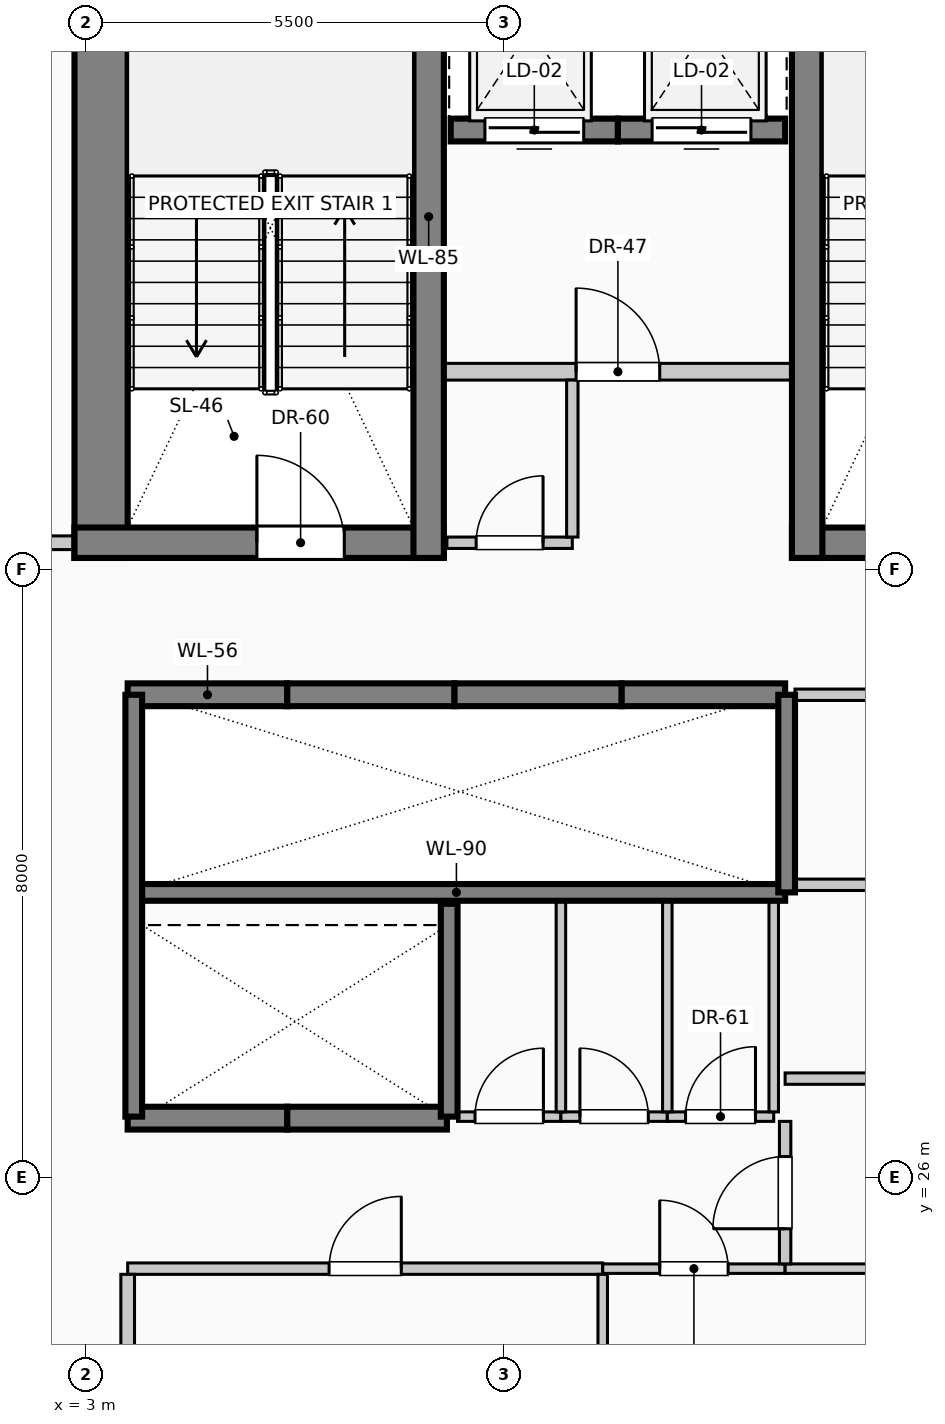
"""IFC4 building model, lengths in metres.
Left out: names, types, materials, properties, quantities, classifications, styles, units other than length and angle.
Written with IfcOpenShell. Run it as: python <this file> out.ifc"""

import sys

from ifc_helpers import new_model, si_unit, direction, frame, frame_2d, origin, place, context, subcontext, project, spatial, rectangle, extrude, element, fill, save


model = new_model("IFC4")
c1 = context("Model", 3, precision=1e-05, world=origin(), true_north=direction((0.0, 1.0)))
c2 = subcontext(c1, "Body", "Model", "MODEL_VIEW")
j1 = project(units=[si_unit("LENGTHUNIT", "METRE"), si_unit("PLANEANGLEUNIT", "RADIAN")], contexts=[c1])
p1 = place(None, origin())
s1 = spatial("IfcSite", under=j1, at=p1, CompositionType="ELEMENT")
p2 = place(p1, origin())
s2 = spatial("IfcBuilding", under=s1, at=p2, CompositionType="ELEMENT")
p3 = place(p2, frame((0.0, 0.0, 214.6)))
s3 = spatial("IfcBuildingStorey", under=s2, at=p3, CompositionType="ELEMENT", Elevation=214.6)
p4 = place(p3, frame((3.2, 34.15, 0.0), z_axis=(0.0, 0.0, 1.0), x_axis=(0.0, 1.0, 0.0)))
e1 = element("IfcWall", 1, at=p4, inside=s3, PredefinedType="SHEAR", context=c2, shape_type="SweptSolid", body=[
    extrude(rectangle(XDim=8.98, YDim=0.7, at=frame_2d((4.49, 0.0))), origin(), (0.0, 0.0, 1.0), 4.0),
])
p5 = place(p3, frame((2.85, 34.35, 0.0), z_axis=(0.0, 0.0, 1.0), x_axis=(1.0, 0.0, 0.0)))
e2 = element("IfcWall", 2, at=p5, inside=s3, PredefinedType="SHEAR", context=c2, shape_type="SweptSolid", body=[
    extrude(rectangle(XDim=4.86, YDim=0.4, at=frame_2d((2.43, 0.0))), origin(), (0.0, 0.0, 1.0), 4.0),
])
p6 = place(p5, frame((2.4, 0.0, 0.0)))
e3 = element("IfcOpeningElement", 3, at=p6, cuts=e2, PredefinedType="OPENING", context=c2, shape_type="SweptSolid", body=[
    extrude(rectangle(XDim=1.15, YDim=2.2, at=frame_2d((0.575, 1.1))), frame((0.0, 0.21, 0.0), z_axis=(0.0, -1.0, 0.0), x_axis=(1.0, 0.0, 0.0)), (0.0, 0.0, 1.0), 0.42),
])
p7 = place(p3, frame((12.29, 34.35, 0.0), z_axis=(0.0, 0.0, 1.0), x_axis=(1.0, 0.0, 0.0)))
e4 = element("IfcWall", 4, at=p7, inside=s3, PredefinedType="SHEAR", context=c2, shape_type="SweptSolid", body=[
    extrude(rectangle(XDim=4.86, YDim=0.4, at=frame_2d((2.43, 0.0))), origin(), (0.0, 0.0, 1.0), 4.0),
])
p8 = place(p7, frame((1.4, 0.0, 0.0)))
e5 = element("IfcOpeningElement", 5, at=p8, cuts=e4, PredefinedType="OPENING", context=c2, shape_type="SweptSolid", body=[
    extrude(rectangle(XDim=1.15, YDim=2.2, at=frame_2d((0.575, 1.1))), frame((0.0, 0.21, 0.0), z_axis=(0.0, -1.0, 0.0), x_axis=(1.0, 0.0, 0.0)), (0.0, 0.0, 1.0), 0.42),
])
for number, where, z_axis, x_axis in (
    (6, (7.51, 34.15, 0.0), (0.0, 0.0, 1.0), (0.0, 1.0, 0.0)),
    (7, (12.49, 34.15, 0.0), (0.0, 0.0, 1.0), (0.0, 1.0, 0.0)),
):
    element("IfcWall", number, at=place(p3, frame(where, z_axis=z_axis, x_axis=x_axis)), inside=s3, PredefinedType="SHEAR", context=c2, shape_type="SweptSolid", body=[
        extrude(rectangle(XDim=8.98, YDim=0.4, at=frame_2d((4.49, 0.0))), origin(), (0.0, 0.0, 1.0), 4.0),
    ])
p9 = place(p3, frame((3.55, 32.35, 0.0), z_axis=(0.0, 0.0, 1.0), x_axis=(1.0, 0.0, 0.0)))
e8 = element("IfcWall", 8, at=p9, inside=s3, PredefinedType="SOLIDWALL", context=c2, shape_type="SweptSolid", body=[
    extrude(rectangle(XDim=2.1, YDim=0.3, at=frame_2d((1.05, 0.0))), origin(), (0.0, 0.0, 1.0), 4.0),
])
p10 = place(p3, frame((5.65, 32.35, 0.0), z_axis=(0.0, 0.0, 1.0), x_axis=(1.0, 0.0, 0.0)))
e9 = element("IfcWall", 9, at=p10, inside=s3, PredefinedType="SOLIDWALL", context=c2, shape_type="SweptSolid", body=[
    extrude(rectangle(XDim=2.2, YDim=0.3, at=frame_2d((1.1, 0.0))), origin(), (0.0, 0.0, 1.0), 4.0),
])
p11 = place(p3, frame((7.85, 32.35, 0.0), z_axis=(0.0, 0.0, 1.0), x_axis=(1.0, 0.0, 0.0)))
e10 = element("IfcWall", 10, at=p11, inside=s3, PredefinedType="SOLIDWALL", context=c2, shape_type="SweptSolid", body=[
    extrude(rectangle(XDim=2.2, YDim=0.3, at=frame_2d((1.1, 0.0))), origin(), (0.0, 0.0, 1.0), 4.0),
])
p12 = place(p3, frame((10.05, 32.35, 0.0), z_axis=(0.0, 0.0, 1.0), x_axis=(1.0, 0.0, 0.0)))
e11 = element("IfcWall", 11, at=p12, inside=s3, PredefinedType="SOLIDWALL", context=c2, shape_type="SweptSolid", body=[
    extrude(rectangle(XDim=2.15, YDim=0.3, at=frame_2d((1.075, 0.0))), origin(), (0.0, 0.0, 1.0), 4.0),
])
p13 = place(p3, frame((5.65, 26.78, 0.0), z_axis=(0.0, 0.0, 1.0), x_axis=(-1.0, 0.0, 0.0)))
e12 = element("IfcWall", 12, at=p13, inside=s3, PredefinedType="SOLIDWALL", context=c2, shape_type="SweptSolid", body=[
    extrude(rectangle(XDim=2.1, YDim=0.3, at=frame_2d((1.05, 0.0))), origin(), (0.0, 0.0, 1.0), 4.0),
])
p14 = place(p3, frame((7.75, 26.78, 0.0), z_axis=(0.0, 0.0, 1.0), x_axis=(-1.0, 0.0, 0.0)))
e13 = element("IfcWall", 13, at=p14, inside=s3, PredefinedType="SOLIDWALL", context=c2, shape_type="SweptSolid", body=[
    extrude(rectangle(XDim=2.1, YDim=0.3, at=frame_2d((1.05, 0.0))), origin(), (0.0, 0.0, 1.0), 4.0),
])
p15 = place(p3, frame((10.0, 39.78, 0.0), z_axis=(0.0, 0.0, 1.0), x_axis=(-1.0, 0.0, 0.0)))
e14 = element("IfcWall", 14, at=p15, inside=s3, PredefinedType="SOLIDWALL", context=c2, shape_type="SweptSolid", body=[
    extrude(rectangle(XDim=2.2, YDim=0.3, at=frame_2d((1.1, 0.0))), origin(), (0.0, 0.0, 1.0), 4.0),
])
p16 = place(p15, frame((0.45, 0.0, 0.0)))
e15 = element("IfcOpeningElement", 15, at=p16, cuts=e14, PredefinedType="OPENING", context=c2, shape_type="SweptSolid", body=[
    extrude(rectangle(XDim=1.3, YDim=2.25, at=frame_2d((0.65, 1.125))), frame((0.0, 0.16, 0.0), z_axis=(0.0, -1.0, 0.0), x_axis=(1.0, 0.0, 0.0)), (0.0, 0.0, 1.0), 0.32),
])
p17 = place(p3, frame((12.2, 39.78, 0.0), z_axis=(0.0, 0.0, 1.0), x_axis=(-1.0, 0.0, 0.0)))
e16 = element("IfcWall", 16, at=p17, inside=s3, PredefinedType="SOLIDWALL", context=c2, shape_type="SweptSolid", body=[
    extrude(rectangle(XDim=2.2, YDim=0.3, at=frame_2d((1.1, 0.0))), origin(), (0.0, 0.0, 1.0), 4.0),
])
p18 = place(p17, frame((0.45, 0.0, 0.0)))
e17 = element("IfcOpeningElement", 17, at=p18, cuts=e16, PredefinedType="OPENING", context=c2, shape_type="SweptSolid", body=[
    extrude(rectangle(XDim=1.3, YDim=2.25, at=frame_2d((0.65, 1.125))), frame((0.0, 0.16, 0.0), z_axis=(0.0, -1.0, 0.0), x_axis=(1.0, 0.0, 0.0)), (0.0, 0.0, 1.0), 0.32),
])
p19 = place(p3, frame((3.55, 29.75, 0.0), z_axis=(0.0, 0.0, 1.0), x_axis=(1.0, 0.0, 0.0)))
e18 = element("IfcWall", 18, at=p19, inside=s3, PredefinedType="SOLIDWALL", context=c2, shape_type="SweptSolid", body=[
    extrude(rectangle(XDim=8.65, YDim=0.22, at=frame_2d((4.325, 0.0))), origin(), (0.0, 0.0, 1.0), 4.0),
])
p20 = place(p3, frame((3.63, 26.8, 0.0), z_axis=(0.0, 0.0, 1.0), x_axis=(0.0, 1.0, 0.0)))
e19 = element("IfcWall", 19, at=p20, inside=s3, PredefinedType="SOLIDWALL", context=c2, shape_type="SweptSolid", body=[
    extrude(rectangle(XDim=5.55, YDim=0.22, at=frame_2d((2.775, 0.0))), origin(), (0.0, 0.0, 1.0), 4.0),
])
p21 = place(p3, frame((7.78, 26.8, 0.0), z_axis=(0.0, 0.0, 1.0), x_axis=(0.0, 1.0, 0.0)))
e20 = element("IfcWall", 20, at=p21, inside=s3, PredefinedType="SOLIDWALL", context=c2, shape_type="SweptSolid", body=[
    extrude(rectangle(XDim=2.8, YDim=0.22, at=frame_2d((1.4, 0.0))), origin(), (0.0, 0.0, 1.0), 4.0),
])
p22 = place(p3, frame((12.22, 29.75, 0.0), z_axis=(0.0, 0.0, 1.0), x_axis=(0.0, 1.0, 0.0)))
e21 = element("IfcWall", 21, at=p22, inside=s3, PredefinedType="SOLIDWALL", context=c2, shape_type="SweptSolid", body=[
    extrude(rectangle(XDim=2.6, YDim=0.22, at=frame_2d((1.3, 0.0))), origin(), (0.0, 0.0, 1.0), 4.0),
])
p23 = place(p3, frame((7.51, 36.6, 0.0), z_axis=(0.0, 0.0, 1.0), x_axis=(1.0, 0.0, 0.0)))
e22 = element("IfcWall", 22, at=p23, inside=s3, PredefinedType="PARTITIONING", context=c2, shape_type="SweptSolid", body=[
    extrude(rectangle(XDim=4.98, YDim=0.22, at=frame_2d((2.49, 0.0))), origin(), (0.0, 0.0, 1.0), 3.75),
])
p24 = place(p23, frame((1.94, 0.0, 0.0)))
e23 = element("IfcOpeningElement", 23, at=p24, cuts=e22, PredefinedType="OPENING", context=c2, shape_type="SweptSolid", body=[
    extrude(rectangle(XDim=1.1, YDim=2.2, at=frame_2d((0.55, 1.1))), frame((0.0, 0.12, 0.0), z_axis=(0.0, -1.0, 0.0), x_axis=(1.0, 0.0, 0.0)), (0.0, 0.0, 1.0), 0.24),
])
p25 = place(p3, frame((3.55, 24.8, 0.0), z_axis=(0.0, 0.0, 1.0), x_axis=(1.0, 0.0, 0.0)))
e24 = element("IfcWall", 24, at=p25, inside=s3, PredefinedType="PARTITIONING", context=c2, shape_type="SweptSolid", body=[
    extrude(rectangle(XDim=6.25, YDim=0.15, at=frame_2d((3.125, 0.0))), origin(), (0.0, 0.0, 1.0), 3.75),
])
p26 = place(p25, frame((2.65, 0.0, 0.0)))
e25 = element("IfcOpeningElement", 25, at=p26, cuts=e24, PredefinedType="OPENING", context=c2, shape_type="SweptSolid", body=[
    extrude(rectangle(XDim=0.95, YDim=2.15, at=frame_2d((0.475, 1.075))), frame((0.0, 0.085, 0.0), z_axis=(0.0, -1.0, 0.0), x_axis=(1.0, 0.0, 0.0)), (0.0, 0.0, 1.0), 0.17),
])
p27 = place(p3, frame((9.8, 24.8, 0.0), z_axis=(0.0, 0.0, 1.0), x_axis=(1.0, 0.0, 0.0)))
e26 = element("IfcWall", 26, at=p27, inside=s3, PredefinedType="PARTITIONING", context=c2, shape_type="SweptSolid", body=[
    extrude(rectangle(XDim=2.4, YDim=0.125, at=frame_2d((1.2, 0.0))), origin(), (0.0, 0.0, 1.0), 3.75),
])
p28 = place(p27, frame((0.75, 0.0, 0.0)))
e27 = element("IfcOpeningElement", 27, at=p28, cuts=e26, PredefinedType="OPENING", context=c2, shape_type="SweptSolid", body=[
    extrude(rectangle(XDim=0.9, YDim=2.1, at=frame_2d((0.45, 1.05))), frame((0.0, 0.073, 0.0), z_axis=(0.0, -1.0, 0.0), x_axis=(1.0, 0.0, 0.0)), (0.0, 0.0, 1.0), 0.145),
])
p29 = place(p3, frame((12.2, 24.8, 0.0), z_axis=(0.0, 0.0, 1.0), x_axis=(1.0, 0.0, 0.0)))
e28 = element("IfcWall", 28, at=p29, inside=s3, PredefinedType="PARTITIONING", context=c2, shape_type="SweptSolid", body=[
    extrude(rectangle(XDim=3.65, YDim=0.125, at=frame_2d((1.825, 0.0))), origin(), (0.0, 0.0, 1.0), 3.75),
])
p30 = place(p3, frame((7.89, 26.8, 0.0), z_axis=(0.0, 0.0, 1.0), x_axis=(1.0, 0.0, 0.0)))
e29 = element("IfcWall", 29, at=p30, inside=s3, PredefinedType="PARTITIONING", context=c2, shape_type="SweptSolid", body=[
    extrude(rectangle(XDim=1.36, YDim=0.125, at=frame_2d((0.68, 0.0))), origin(), (0.0, 0.0, 1.0), 3.75),
])
p31 = place(p30, frame((0.23, 0.0, 0.0)))
e30 = element("IfcOpeningElement", 30, at=p31, cuts=e29, PredefinedType="OPENING", context=c2, shape_type="SweptSolid", body=[
    extrude(rectangle(XDim=0.9, YDim=2.1, at=frame_2d((0.45, 1.05))), frame((0.0, 0.073, 0.0), z_axis=(0.0, -1.0, 0.0), x_axis=(1.0, 0.0, 0.0)), (0.0, 0.0, 1.0), 0.145),
])
p32 = place(p3, frame((9.25, 26.8, 0.0), z_axis=(0.0, 0.0, 1.0), x_axis=(1.0, 0.0, 0.0)))
e31 = element("IfcWall", 31, at=p32, inside=s3, PredefinedType="PARTITIONING", context=c2, shape_type="SweptSolid", body=[
    extrude(rectangle(XDim=1.4, YDim=0.125, at=frame_2d((0.7, 0.0))), origin(), (0.0, 0.0, 1.0), 3.75),
])
p33 = place(p32, frame((0.25, 0.0, 0.0)))
e32 = element("IfcOpeningElement", 32, at=p33, cuts=e31, PredefinedType="OPENING", context=c2, shape_type="SweptSolid", body=[
    extrude(rectangle(XDim=0.9, YDim=2.1, at=frame_2d((0.45, 1.05))), frame((0.0, 0.073, 0.0), z_axis=(0.0, -1.0, 0.0), x_axis=(1.0, 0.0, 0.0)), (0.0, 0.0, 1.0), 0.145),
])
p34 = place(p3, frame((10.65, 26.8, 0.0), z_axis=(0.0, 0.0, 1.0), x_axis=(1.0, 0.0, 0.0)))
e33 = element("IfcWall", 33, at=p34, inside=s3, PredefinedType="PARTITIONING", context=c2, shape_type="SweptSolid", body=[
    extrude(rectangle(XDim=1.4, YDim=0.125, at=frame_2d((0.7, 0.0))), origin(), (0.0, 0.0, 1.0), 3.75),
])
p35 = place(p34, frame((0.24, 0.0, 0.0)))
e34 = element("IfcOpeningElement", 34, at=p35, cuts=e33, PredefinedType="OPENING", context=c2, shape_type="SweptSolid", body=[
    extrude(rectangle(XDim=0.92, YDim=2.1, at=frame_2d((0.46, 1.05))), frame((0.0, 0.073, 0.0), z_axis=(0.0, -1.0, 0.0), x_axis=(1.0, 0.0, 0.0)), (0.0, 0.0, 1.0), 0.145),
])
p36 = place(p3, frame((12.2, 27.3, 0.0), z_axis=(0.0, 0.0, 1.0), x_axis=(1.0, 0.0, 0.0)))
e35 = element("IfcWall", 35, at=p36, inside=s3, PredefinedType="PARTITIONING", context=c2, shape_type="SweptSolid", body=[
    extrude(rectangle(XDim=8.8, YDim=0.15, at=frame_2d((4.4, 0.0))), origin(), (0.0, 0.0, 1.0), 3.75),
])
p37 = place(p3, frame((12.33, 29.85, 0.0), z_axis=(0.0, 0.0, 1.0), x_axis=(1.0, 0.0, 0.0)))
e36 = element("IfcWall", 36, at=p37, inside=s3, PredefinedType="PARTITIONING", context=c2, shape_type="SweptSolid", body=[
    extrude(rectangle(XDim=8.67, YDim=0.15, at=frame_2d((4.335, 0.0))), origin(), (0.0, 0.0, 1.0), 3.75),
])
p38 = place(p3, frame((12.33, 32.35, 0.0), z_axis=(0.0, 0.0, 1.0), x_axis=(1.0, 0.0, 0.0)))
e37 = element("IfcWall", 37, at=p38, inside=s3, PredefinedType="PARTITIONING", context=c2, shape_type="SweptSolid", body=[
    extrude(rectangle(XDim=3.52, YDim=0.15, at=frame_2d((1.76, 0.0))), origin(), (0.0, 0.0, 1.0), 3.75),
])
p39 = place(p38, frame((1.235, 0.0, 0.0)))
e38 = element("IfcOpeningElement", 38, at=p39, cuts=e37, PredefinedType="OPENING", context=c2, shape_type="SweptSolid", body=[
    extrude(rectangle(XDim=1.05, YDim=2.15, at=frame_2d((0.525, 1.075))), frame((0.0, 0.085, 0.0), z_axis=(0.0, -1.0, 0.0), x_axis=(1.0, 0.0, 0.0)), (0.0, 0.0, 1.0), 0.17),
])
p40 = place(p3, frame((1.15, 34.35, 0.0), z_axis=(0.0, 0.0, 1.0), x_axis=(1.0, 0.0, 0.0)))
e39 = element("IfcWall", 39, at=p40, inside=s3, PredefinedType="PARTITIONING", context=c2, shape_type="SweptSolid", body=[
    extrude(rectangle(XDim=1.7, YDim=0.18, at=frame_2d((0.85, 0.0))), origin(), (0.0, 0.0, 1.0), 3.75),
])
p41 = place(p3, frame((7.75, 34.35, 0.0), z_axis=(0.0, 0.0, 1.0), x_axis=(1.0, 0.0, 0.0)))
e40 = element("IfcWall", 40, at=p41, inside=s3, PredefinedType="PARTITIONING", context=c2, shape_type="SweptSolid", body=[
    extrude(rectangle(XDim=1.65, YDim=0.15, at=frame_2d((0.825, 0.0))), origin(), (0.0, 0.0, 1.0), 3.75),
])
p42 = place(p41, frame((0.385, 0.0, 0.0)))
e41 = element("IfcOpeningElement", 41, at=p42, cuts=e40, PredefinedType="OPENING", context=c2, shape_type="SweptSolid", body=[
    extrude(rectangle(XDim=0.88, YDim=2.1, at=frame_2d((0.44, 1.05))), frame((0.0, 0.085, 0.0), z_axis=(0.0, -1.0, 0.0), x_axis=(1.0, 0.0, 0.0)), (0.0, 0.0, 1.0), 0.17),
])
p43 = place(p3, frame((3.55, 17.375, 0.0), z_axis=(0.0, 0.0, 1.0), x_axis=(0.0, 1.0, 0.0)))
e42 = element("IfcWall", 42, at=p43, inside=s3, PredefinedType="PARTITIONING", context=c2, shape_type="SweptSolid", body=[
    extrude(rectangle(XDim=7.35, YDim=0.18, at=frame_2d((3.675, 0.0))), origin(), (0.0, 0.0, 1.0), 3.75),
])
p44 = place(p3, frame((9.25, 26.863, 0.0), z_axis=(0.0, 0.0, 1.0), x_axis=(0.0, 1.0, 0.0)))
e43 = element("IfcWall", 43, at=p44, inside=s3, PredefinedType="PARTITIONING", context=c2, shape_type="SweptSolid", body=[
    extrude(rectangle(XDim=2.777, YDim=0.125, at=frame_2d((1.389, 0.0))), origin(), (0.0, 0.0, 1.0), 3.75),
])
p45 = place(p3, frame((9.4, 34.425, 0.0), z_axis=(0.0, 0.0, 1.0), x_axis=(0.0, 1.0, 0.0)))
e44 = element("IfcWall", 44, at=p45, inside=s3, PredefinedType="PARTITIONING", context=c2, shape_type="SweptSolid", body=[
    extrude(rectangle(XDim=2.065, YDim=0.15, at=frame_2d((1.032, 0.0))), origin(), (0.0, 0.0, 1.0), 3.75),
])
p46 = place(p3, frame((9.8, 17.375, 0.0), z_axis=(0.0, 0.0, 1.0), x_axis=(0.0, 1.0, 0.0)))
e45 = element("IfcWall", 45, at=p46, inside=s3, PredefinedType="PARTITIONING", context=c2, shape_type="SweptSolid", body=[
    extrude(rectangle(XDim=7.35, YDim=0.125, at=frame_2d((3.675, 0.0))), origin(), (0.0, 0.0, 1.0), 3.75),
])
for number, where, z_axis, x_axis in (
    (46, (10.65, 26.863, 0.0), (0.0, 0.0, 1.0), (0.0, 1.0, 0.0)),
    (47, (12.05, 26.863, 0.0), (0.0, 0.0, 1.0), (0.0, 1.0, 0.0)),
):
    element("IfcWall", number, at=place(p3, frame(where, z_axis=z_axis, x_axis=x_axis)), inside=s3, PredefinedType="PARTITIONING", context=c2, shape_type="SweptSolid", body=[
        extrude(rectangle(XDim=2.777, YDim=0.125, at=frame_2d((1.389, 0.0))), origin(), (0.0, 0.0, 1.0), 3.75),
    ])
p47 = place(p3, frame((12.2, 24.863, 0.0), z_axis=(0.0, 0.0, 1.0), x_axis=(0.0, 1.0, 0.0)))
e48 = element("IfcWall", 48, at=p47, inside=s3, PredefinedType="PARTITIONING", context=c2, shape_type="SweptSolid", body=[
    extrude(rectangle(XDim=1.875, YDim=0.15, at=frame_2d((0.938, 0.0))), origin(), (0.0, 0.0, 1.0), 3.75),
])
p48 = place(p47, frame((0.462, 0.0, 0.0)))
e49 = element("IfcOpeningElement", 49, at=p48, cuts=e48, PredefinedType="OPENING", context=c2, shape_type="SweptSolid", body=[
    extrude(rectangle(XDim=0.95, YDim=2.15, at=frame_2d((0.475, 1.075))), frame((0.0, 0.085, 0.0), z_axis=(0.0, -1.0, 0.0), x_axis=(1.0, 0.0, 0.0)), (0.0, 0.0, 1.0), 0.17),
])
p49 = place(p16, origin())
e50 = element("IfcDoor", 50, at=p49, inside=s3, OperationType="SLIDING_TO_LEFT", PredefinedType="DOOR", context=c2, shape_type="SweptSolid", body=[
    extrude(rectangle(XDim=1.3, YDim=2.25, at=frame_2d((0.65, 1.125))), frame((0.0, 0.025, 0.0), z_axis=(0.0, -1.0, 0.0), x_axis=(1.0, 0.0, 0.0)), (0.0, 0.0, 1.0), 0.05),
])
fill(e15, e50)
p50 = place(p18, origin())
e51 = element("IfcDoor", 51, at=p50, inside=s3, OperationType="SLIDING_TO_RIGHT", PredefinedType="DOOR", context=c2, shape_type="SweptSolid", body=[
    extrude(rectangle(XDim=1.3, YDim=2.25, at=frame_2d((0.65, 1.125))), frame((0.0, 0.025, 0.0), z_axis=(0.0, -1.0, 0.0), x_axis=(1.0, 0.0, 0.0)), (0.0, 0.0, 1.0), 0.05),
])
fill(e17, e51)
p51 = place(p6, origin())
e52 = element("IfcDoor", 52, at=p51, inside=s3, OperationType="SINGLE_SWING_LEFT", PredefinedType="DOOR", context=c2, shape_type="SweptSolid", body=[
    extrude(rectangle(XDim=1.15, YDim=2.2, at=frame_2d((0.575, 1.1))), frame((0.0, 0.025, 0.0), z_axis=(0.0, -1.0, 0.0), x_axis=(1.0, 0.0, 0.0)), (0.0, 0.0, 1.0), 0.05),
])
fill(e3, e52)
p52 = place(p24, origin())
e53 = element("IfcDoor", 53, at=p52, inside=s3, OperationType="SINGLE_SWING_LEFT", PredefinedType="DOOR", context=c2, shape_type="SweptSolid", body=[
    extrude(rectangle(XDim=1.1, YDim=2.2, at=frame_2d((0.55, 1.1))), frame((0.0, 0.025, 0.0), z_axis=(0.0, -1.0, 0.0), x_axis=(1.0, 0.0, 0.0)), (0.0, 0.0, 1.0), 0.05),
])
fill(e23, e53)
p53 = place(p26, origin())
e54 = element("IfcDoor", 54, at=p53, inside=s3, OperationType="SINGLE_SWING_RIGHT", PredefinedType="DOOR", context=c2, shape_type="SweptSolid", body=[
    extrude(rectangle(XDim=0.95, YDim=2.15, at=frame_2d((0.475, 1.075))), frame((0.0, 0.025, 0.0), z_axis=(0.0, -1.0, 0.0), x_axis=(1.0, 0.0, 0.0)), (0.0, 0.0, 1.0), 0.05),
])
fill(e25, e54)
p54 = place(p28, origin())
e55 = element("IfcDoor", 55, at=p54, inside=s3, OperationType="SINGLE_SWING_LEFT", PredefinedType="DOOR", context=c2, shape_type="SweptSolid", body=[
    extrude(rectangle(XDim=0.9, YDim=2.1, at=frame_2d((0.45, 1.05))), frame((0.0, 0.025, 0.0), z_axis=(0.0, -1.0, 0.0), x_axis=(1.0, 0.0, 0.0)), (0.0, 0.0, 1.0), 0.05),
])
fill(e27, e55)
p55 = place(p31, origin())
e56 = element("IfcDoor", 56, at=p55, inside=s3, OperationType="SINGLE_SWING_RIGHT", PredefinedType="DOOR", context=c2, shape_type="SweptSolid", body=[
    extrude(rectangle(XDim=0.9, YDim=2.1, at=frame_2d((0.45, 1.05))), frame((0.0, 0.025, 0.0), z_axis=(0.0, -1.0, 0.0), x_axis=(1.0, 0.0, 0.0)), (0.0, 0.0, 1.0), 0.05),
])
fill(e30, e56)
p56 = place(p33, origin())
e57 = element("IfcDoor", 57, at=p56, inside=s3, OperationType="SINGLE_SWING_LEFT", PredefinedType="DOOR", context=c2, shape_type="SweptSolid", body=[
    extrude(rectangle(XDim=0.9, YDim=2.1, at=frame_2d((0.45, 1.05))), frame((0.0, 0.025, 0.0), z_axis=(0.0, -1.0, 0.0), x_axis=(1.0, 0.0, 0.0)), (0.0, 0.0, 1.0), 0.05),
])
fill(e32, e57)
p57 = place(p35, origin())
e58 = element("IfcDoor", 58, at=p57, inside=s3, OperationType="SINGLE_SWING_RIGHT", PredefinedType="DOOR", context=c2, shape_type="SweptSolid", body=[
    extrude(rectangle(XDim=0.92, YDim=2.1, at=frame_2d((0.46, 1.05))), frame((0.0, 0.025, 0.0), z_axis=(0.0, -1.0, 0.0), x_axis=(1.0, 0.0, 0.0)), (0.0, 0.0, 1.0), 0.05),
])
fill(e34, e58)
p58 = place(p42, origin())
e59 = element("IfcDoor", 59, at=p58, inside=s3, OperationType="SINGLE_SWING_RIGHT", PredefinedType="DOOR", context=c2, shape_type="SweptSolid", body=[
    extrude(rectangle(XDim=0.88, YDim=2.1, at=frame_2d((0.44, 1.05))), frame((0.0, 0.025, 0.0), z_axis=(0.0, -1.0, 0.0), x_axis=(1.0, 0.0, 0.0)), (0.0, 0.0, 1.0), 0.05),
])
fill(e41, e59)
p59 = place(p48, origin())
e60 = element("IfcDoor", 60, at=p59, inside=s3, OperationType="SINGLE_SWING_LEFT", PredefinedType="DOOR", context=c2, shape_type="SweptSolid", body=[
    extrude(rectangle(XDim=0.95, YDim=2.15, at=frame_2d((0.475, 1.075))), frame((0.0, 0.025, 0.0), z_axis=(0.0, -1.0, 0.0), x_axis=(1.0, 0.0, 0.0)), (0.0, 0.0, 1.0), 0.05),
])
fill(e49, e60)
save(model, sys.argv[1])
